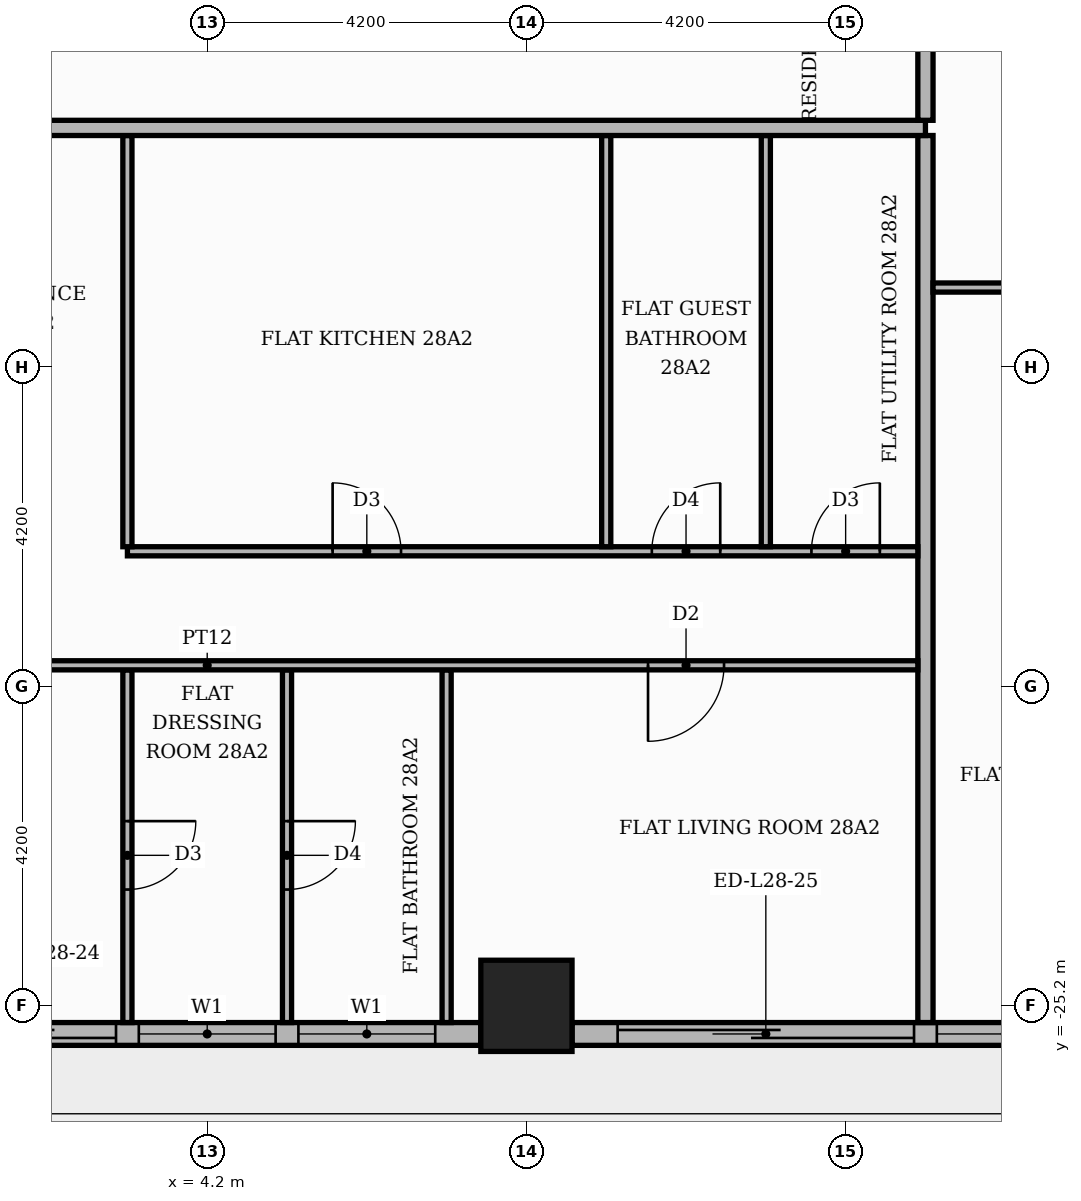
"""IFC4 building model, lengths in metres.
Left out: names, types, materials, properties, quantities, classifications, styles, units other than length and angle.
Written with IfcOpenShell. Run it as: python <this file> out.ifc"""

import sys

from ifc_helpers import new_model, si_unit, direction, frame, frame_2d, origin, origin_2d, place, context, subcontext, project, spatial, rectangle, extrude, element, fill, save


model = new_model("IFC4")
c1 = context("Model", 3, precision=1e-05, world=origin(), true_north=direction((0.0, 1.0)))
c2 = subcontext(c1, "Body", "Model", "MODEL_VIEW")
j1 = project(units=[si_unit("LENGTHUNIT", "METRE"), si_unit("PLANEANGLEUNIT", "RADIAN")], contexts=[c1])
p1 = place(None, origin())
s1 = spatial("IfcSite", under=j1, at=p1, CompositionType="ELEMENT")
p2 = place(p1, origin())
s2 = spatial("IfcBuilding", under=s1, at=p2, CompositionType="ELEMENT")
p3 = place(p2, frame((0.0, 0.0, 118.2)))
s3 = spatial("IfcBuildingStorey", under=s2, at=p3, CompositionType="ELEMENT", Elevation=118.2)
p4 = place(p3, frame((8.4, -25.2, 0.0), z_axis=(0.0, 0.0, 1.0), x_axis=(1.0, 0.0, 0.0)))
e1 = element("IfcColumn", 1, at=p4, inside=s3, PredefinedType="COLUMN", context=c2, shape_type="SweptSolid", body=[
    extrude(rectangle(XDim=1.2, YDim=1.2, at=origin_2d()), origin(), (0.0, 0.0, 1.0), 3.9),
])
p5 = place(p3, frame((0.6, -25.57, 0.0), z_axis=(0.0, 0.0, 1.0), x_axis=(1.0, 0.0, 0.0)))
e2 = element("IfcWall", 2, at=p5, inside=s3, PredefinedType="STANDARD", context=c2, shape_type="SweptSolid", body=[
    extrude(rectangle(XDim=7.2, YDim=0.3, at=frame_2d((3.6, 0.0))), origin(), (0.0, 0.0, 1.0), 3.48),
])
p6 = place(p5, frame((0.6, 0.0, 0.0)))
e3 = element("IfcOpeningElement", 3, at=p6, cuts=e2, PredefinedType="OPENING", context=c2, shape_type="SweptSolid", body=[
    extrude(rectangle(XDim=1.8, YDim=2.4, at=frame_2d((0.9, 1.2))), frame((0.0, 0.16, 0.0), z_axis=(0.0, -1.0, 0.0), x_axis=(1.0, 0.0, 0.0)), (0.0, 0.0, 1.0), 0.32),
])
p7 = place(p5, frame((2.7, 0.0, 0.9)))
e4 = element("IfcOpeningElement", 4, at=p7, cuts=e2, PredefinedType="OPENING", context=c2, shape_type="SweptSolid", body=[
    extrude(rectangle(XDim=1.8, YDim=2.1, at=frame_2d((0.9, 1.05))), frame((0.0, 0.16, 0.0), z_axis=(0.0, -1.0, 0.0), x_axis=(1.0, 0.0, 0.0)), (0.0, 0.0, 1.0), 0.32),
])
p8 = place(p5, frame((4.8, 0.0, 0.9)))
e5 = element("IfcOpeningElement", 5, at=p8, cuts=e2, PredefinedType="OPENING", context=c2, shape_type="SweptSolid", body=[
    extrude(rectangle(XDim=1.8, YDim=2.1, at=frame_2d((0.9, 1.05))), frame((0.0, 0.16, 0.0), z_axis=(0.0, -1.0, 0.0), x_axis=(1.0, 0.0, 0.0)), (0.0, 0.0, 1.0), 0.32),
])
p9 = place(p3, frame((9.0, -25.57, 0.0), z_axis=(0.0, 0.0, 1.0), x_axis=(1.0, 0.0, 0.0)))
e6 = element("IfcWall", 6, at=p9, inside=s3, PredefinedType="STANDARD", context=c2, shape_type="SweptSolid", body=[
    extrude(rectangle(XDim=7.2, YDim=0.3, at=frame_2d((3.6, 0.0))), origin(), (0.0, 0.0, 1.0), 3.48),
])
p10 = place(p9, frame((0.6, 0.0, 0.0)))
e7 = element("IfcOpeningElement", 7, at=p10, cuts=e6, PredefinedType="OPENING", context=c2, shape_type="SweptSolid", body=[
    extrude(rectangle(XDim=3.9, YDim=2.4, at=frame_2d((1.95, 1.2))), frame((0.0, 0.16, 0.0), z_axis=(0.0, -1.0, 0.0), x_axis=(1.0, 0.0, 0.0)), (0.0, 0.0, 1.0), 0.32),
])
p11 = place(p9, frame((4.8, 0.0, 0.9)))
e8 = element("IfcOpeningElement", 8, at=p11, cuts=e6, PredefinedType="OPENING", context=c2, shape_type="SweptSolid", body=[
    extrude(rectangle(XDim=1.8, YDim=2.1, at=frame_2d((0.9, 1.05))), frame((0.0, 0.16, 0.0), z_axis=(0.0, -1.0, 0.0), x_axis=(1.0, 0.0, 0.0)), (0.0, 0.0, 1.0), 0.32),
])
p12 = place(p3, frame((3.15, -25.42, 0.0), z_axis=(0.0, 0.0, 1.0), x_axis=(0.0, 1.0, 0.0)))
e9 = element("IfcWall", 9, at=p12, inside=s3, PredefinedType="PARTITIONING", context=c2, shape_type="SweptSolid", body=[
    extrude(rectangle(XDim=4.64, YDim=0.12, at=frame_2d((2.32, 0.0))), origin(), (0.0, 0.0, 1.0), 3.48),
])
p13 = place(p12, frame((1.75, 0.0, 0.0)))
e10 = element("IfcOpeningElement", 10, at=p13, cuts=e9, PredefinedType="OPENING", context=c2, shape_type="SweptSolid", body=[
    extrude(rectangle(XDim=0.9, YDim=2.1, at=frame_2d((0.45, 1.05))), frame((0.0, 0.07, 0.0), z_axis=(0.0, -1.0, 0.0), x_axis=(1.0, 0.0, 0.0)), (0.0, 0.0, 1.0), 0.14),
])
p14 = place(p3, frame((5.25, -25.42, 0.0), z_axis=(0.0, 0.0, 1.0), x_axis=(0.0, 1.0, 0.0)))
e11 = element("IfcWall", 11, at=p14, inside=s3, PredefinedType="PARTITIONING", context=c2, shape_type="SweptSolid", body=[
    extrude(rectangle(XDim=4.64, YDim=0.12, at=frame_2d((2.32, 0.0))), origin(), (0.0, 0.0, 1.0), 3.48),
])
p15 = place(p14, frame((1.75, 0.0, 0.0)))
e12 = element("IfcOpeningElement", 12, at=p15, cuts=e11, PredefinedType="OPENING", context=c2, shape_type="SweptSolid", body=[
    extrude(rectangle(XDim=0.9, YDim=2.1, at=frame_2d((0.45, 1.05))), frame((0.0, 0.07, 0.0), z_axis=(0.0, -1.0, 0.0), x_axis=(1.0, 0.0, 0.0)), (0.0, 0.0, 1.0), 0.14),
])
p16 = place(p3, frame((7.35, -25.42, 0.0), z_axis=(0.0, 0.0, 1.0), x_axis=(0.0, 1.0, 0.0)))
e13 = element("IfcWall", 13, at=p16, inside=s3, PredefinedType="PARTITIONING", context=c2, shape_type="SweptSolid", body=[
    extrude(rectangle(XDim=4.64, YDim=0.12, at=frame_2d((2.32, 0.0))), origin(), (0.0, 0.0, 1.0), 3.48),
])
p17 = place(p3, frame((13.65, -25.42, 0.0), z_axis=(0.0, 0.0, 1.0), x_axis=(0.0, 1.0, 0.0)))
e14 = element("IfcWall", 14, at=p17, inside=s3, PredefinedType="PARTITIONING", context=c2, shape_type="SweptSolid", body=[
    extrude(rectangle(XDim=11.67, YDim=0.2, at=frame_2d((5.835, 0.0))), origin(), (0.0, 0.0, 1.0), 3.48),
])
p18 = place(p3, frame((-5.15, -20.72, 0.0), z_axis=(0.0, 0.0, 1.0), x_axis=(1.0, 0.0, 0.0)))
e15 = element("IfcWall", 15, at=p18, inside=s3, PredefinedType="PARTITIONING", context=c2, shape_type="SweptSolid", body=[
    extrude(rectangle(XDim=18.7, YDim=0.12, at=frame_2d((9.35, 0.0))), origin(), (0.0, 0.0, 1.0), 3.48),
])
p19 = place(p18, frame((3.65, 0.0, 0.0)))
e16 = element("IfcOpeningElement", 16, at=p19, cuts=e15, PredefinedType="OPENING", context=c2, shape_type="SweptSolid", body=[
    extrude(rectangle(XDim=0.9, YDim=2.1, at=frame_2d((0.45, 1.05))), frame((0.0, 0.07, 0.0), z_axis=(0.0, -1.0, 0.0), x_axis=(1.0, 0.0, 0.0)), (0.0, 0.0, 1.0), 0.14),
])
p20 = place(p18, frame((15.15, 0.0, 0.0)))
e17 = element("IfcOpeningElement", 17, at=p20, cuts=e15, PredefinedType="OPENING", context=c2, shape_type="SweptSolid", body=[
    extrude(rectangle(XDim=1.0, YDim=2.1, at=frame_2d((0.5, 1.05))), frame((0.0, 0.07, 0.0), z_axis=(0.0, -1.0, 0.0), x_axis=(1.0, 0.0, 0.0)), (0.0, 0.0, 1.0), 0.14),
])
p21 = place(p3, frame((3.15, -19.22, 0.0), z_axis=(0.0, 0.0, 1.0), x_axis=(1.0, 0.0, 0.0)))
e18 = element("IfcWall", 18, at=p21, inside=s3, PredefinedType="PARTITIONING", context=c2, shape_type="SweptSolid", body=[
    extrude(rectangle(XDim=10.4, YDim=0.12, at=frame_2d((5.2, 0.0))), origin(), (0.0, 0.0, 1.0), 3.48),
])
p22 = place(p21, frame((2.7, 0.0, 0.0)))
e19 = element("IfcOpeningElement", 19, at=p22, cuts=e18, PredefinedType="OPENING", context=c2, shape_type="SweptSolid", body=[
    extrude(rectangle(XDim=0.9, YDim=2.1, at=frame_2d((0.45, 1.05))), frame((0.0, 0.07, 0.0), z_axis=(0.0, -1.0, 0.0), x_axis=(1.0, 0.0, 0.0)), (0.0, 0.0, 1.0), 0.14),
])
p23 = place(p21, frame((6.9, 0.0, 0.0)))
e20 = element("IfcOpeningElement", 20, at=p23, cuts=e18, PredefinedType="OPENING", context=c2, shape_type="SweptSolid", body=[
    extrude(rectangle(XDim=0.9, YDim=2.1, at=frame_2d((0.45, 1.05))), frame((0.0, 0.07, 0.0), z_axis=(0.0, -1.0, 0.0), x_axis=(1.0, 0.0, 0.0)), (0.0, 0.0, 1.0), 0.14),
])
p24 = place(p21, frame((9.0, 0.0, 0.0)))
e21 = element("IfcOpeningElement", 21, at=p24, cuts=e18, PredefinedType="OPENING", context=c2, shape_type="SweptSolid", body=[
    extrude(rectangle(XDim=0.9, YDim=2.1, at=frame_2d((0.45, 1.05))), frame((0.0, 0.07, 0.0), z_axis=(0.0, -1.0, 0.0), x_axis=(1.0, 0.0, 0.0)), (0.0, 0.0, 1.0), 0.14),
])
for number, where, z_axis, x_axis in (
    (22, (3.15, -19.16, 0.0), (0.0, 0.0, 1.0), (0.0, 1.0, 0.0)),
    (23, (9.45, -19.16, 0.0), (0.0, 0.0, 1.0), (0.0, 1.0, 0.0)),
    (24, (11.55, -19.16, 0.0), (0.0, 0.0, 1.0), (0.0, 1.0, 0.0)),
):
    element("IfcWall", number, at=place(p3, frame(where, z_axis=z_axis, x_axis=x_axis)), inside=s3, PredefinedType="PARTITIONING", context=c2, shape_type="SweptSolid", body=[
        extrude(rectangle(XDim=5.41, YDim=0.12, at=frame_2d((2.705, 0.0))), origin(), (0.0, 0.0, 1.0), 3.48),
    ])
p25 = place(p3, frame((13.75, -15.75, 0.0), z_axis=(0.0, 0.0, 1.0), x_axis=(1.0, 0.0, 0.0)))
e25 = element("IfcWall", 25, at=p25, inside=s3, PredefinedType="PARTITIONING", context=c2, shape_type="SweptSolid", body=[
    extrude(rectangle(XDim=6.07, YDim=0.12, at=frame_2d((3.035, 0.0))), origin(), (0.0, 0.0, 1.0), 3.48),
])
p26 = place(p25, frame((2.485, 0.0, 0.0)))
e26 = element("IfcOpeningElement", 26, at=p26, cuts=e25, PredefinedType="OPENING", context=c2, shape_type="SweptSolid", body=[
    extrude(rectangle(XDim=1.0, YDim=2.1, at=frame_2d((0.5, 1.05))), frame((0.0, 0.07, 0.0), z_axis=(0.0, -1.0, 0.0), x_axis=(1.0, 0.0, 0.0)), (0.0, 0.0, 1.0), 0.14),
])
p27 = place(p3, frame((-20.42, -13.65, 0.0), z_axis=(0.0, 0.0, 1.0), x_axis=(1.0, 0.0, 0.0)))
e27 = element("IfcWall", 27, at=p27, inside=s3, PredefinedType="PARTITIONING", context=c2, shape_type="SweptSolid", body=[
    extrude(rectangle(XDim=34.07, YDim=0.2, at=frame_2d((17.035, 0.0))), origin(), (0.0, 0.0, 1.0), 3.48),
])
p28 = place(p27, frame((8.32, 0.0, 0.0)))
e28 = element("IfcOpeningElement", 28, at=p28, cuts=e27, PredefinedType="OPENING", context=c2, shape_type="SweptSolid", body=[
    extrude(rectangle(XDim=1.1, YDim=2.4, at=frame_2d((0.55, 1.2))), frame((0.0, 0.11, 0.0), z_axis=(0.0, -1.0, 0.0), x_axis=(1.0, 0.0, 0.0)), (0.0, 0.0, 1.0), 0.22),
])
p29 = place(p27, frame((20.92, 0.0, 0.0)))
e29 = element("IfcOpeningElement", 29, at=p29, cuts=e27, PredefinedType="OPENING", context=c2, shape_type="SweptSolid", body=[
    extrude(rectangle(XDim=1.1, YDim=2.4, at=frame_2d((0.55, 1.2))), frame((0.0, 0.11, 0.0), z_axis=(0.0, -1.0, 0.0), x_axis=(1.0, 0.0, 0.0)), (0.0, 0.0, 1.0), 0.22),
])
p30 = place(p3, frame((13.65, -13.55, 0.0), z_axis=(0.0, 0.0, 1.0), x_axis=(0.0, 1.0, 0.0)))
e30 = element("IfcWall", 30, at=p30, inside=s3, PredefinedType="PARTITIONING", context=c2, shape_type="SweptSolid", body=[
    extrude(rectangle(XDim=8.2, YDim=0.2, at=frame_2d((4.1, 0.0))), origin(), (0.0, 0.0, 1.0), 3.48),
])
p31 = place(p30, frame((1.45, 0.0, 0.0)))
e31 = element("IfcOpeningElement", 31, at=p31, cuts=e30, PredefinedType="OPENING", context=c2, shape_type="SweptSolid", body=[
    extrude(rectangle(XDim=1.1, YDim=2.4, at=frame_2d((0.55, 1.2))), frame((0.0, 0.11, 0.0), z_axis=(0.0, -1.0, 0.0), x_axis=(1.0, 0.0, 0.0)), (0.0, 0.0, 1.0), 0.22),
])
p32 = place(p6, origin())
e32 = element("IfcDoor", 32, at=p32, inside=s3, OperationType="SLIDING_TO_LEFT", PredefinedType="DOOR", context=c2, shape_type="SweptSolid", body=[
    extrude(rectangle(XDim=1.8, YDim=2.4, at=frame_2d((0.9, 1.2))), frame((0.0, 0.025, 0.0), z_axis=(0.0, -1.0, 0.0), x_axis=(1.0, 0.0, 0.0)), (0.0, 0.0, 1.0), 0.05),
])
fill(e3, e32)
p33 = place(p7, origin())
e33 = element("IfcWindow", 33, at=p33, inside=s3, PartitioningType="SINGLE_PANEL", PredefinedType="WINDOW", context=c2, shape_type="SweptSolid", body=[
    extrude(rectangle(XDim=1.8, YDim=2.1, at=frame_2d((0.9, 1.05))), frame((0.0, 0.03, 0.0), z_axis=(0.0, -1.0, 0.0), x_axis=(1.0, 0.0, 0.0)), (0.0, 0.0, 1.0), 0.06),
])
fill(e4, e33)
p34 = place(p8, origin())
e34 = element("IfcWindow", 34, at=p34, inside=s3, PartitioningType="SINGLE_PANEL", PredefinedType="WINDOW", context=c2, shape_type="SweptSolid", body=[
    extrude(rectangle(XDim=1.8, YDim=2.1, at=frame_2d((0.9, 1.05))), frame((0.0, 0.03, 0.0), z_axis=(0.0, -1.0, 0.0), x_axis=(1.0, 0.0, 0.0)), (0.0, 0.0, 1.0), 0.06),
])
fill(e5, e34)
p35 = place(p10, origin())
e35 = element("IfcDoor", 35, at=p35, inside=s3, OperationType="SLIDING_TO_LEFT", PredefinedType="DOOR", context=c2, shape_type="SweptSolid", body=[
    extrude(rectangle(XDim=3.9, YDim=2.4, at=frame_2d((1.95, 1.2))), frame((0.0, 0.025, 0.0), z_axis=(0.0, -1.0, 0.0), x_axis=(1.0, 0.0, 0.0)), (0.0, 0.0, 1.0), 0.05),
])
fill(e7, e35)
p36 = place(p11, origin())
e36 = element("IfcWindow", 36, at=p36, inside=s3, PartitioningType="SINGLE_PANEL", PredefinedType="WINDOW", context=c2, shape_type="SweptSolid", body=[
    extrude(rectangle(XDim=1.8, YDim=2.1, at=frame_2d((0.9, 1.05))), frame((0.0, 0.03, 0.0), z_axis=(0.0, -1.0, 0.0), x_axis=(1.0, 0.0, 0.0)), (0.0, 0.0, 1.0), 0.06),
])
fill(e8, e36)
p37 = place(p22, origin())
e37 = element("IfcDoor", 37, at=p37, inside=s3, OperationType="SINGLE_SWING_LEFT", PredefinedType="DOOR", context=c2, shape_type="SweptSolid", body=[
    extrude(rectangle(XDim=0.9, YDim=2.1, at=frame_2d((0.45, 1.05))), frame((0.0, 0.025, 0.0), z_axis=(0.0, -1.0, 0.0), x_axis=(1.0, 0.0, 0.0)), (0.0, 0.0, 1.0), 0.05),
])
fill(e19, e37)
p38 = place(p23, origin())
e38 = element("IfcDoor", 38, at=p38, inside=s3, OperationType="SINGLE_SWING_RIGHT", PredefinedType="DOOR", context=c2, shape_type="SweptSolid", body=[
    extrude(rectangle(XDim=0.9, YDim=2.1, at=frame_2d((0.45, 1.05))), frame((0.0, 0.025, 0.0), z_axis=(0.0, -1.0, 0.0), x_axis=(1.0, 0.0, 0.0)), (0.0, 0.0, 1.0), 0.05),
])
fill(e20, e38)
p39 = place(p24, origin())
e39 = element("IfcDoor", 39, at=p39, inside=s3, OperationType="SINGLE_SWING_RIGHT", PredefinedType="DOOR", context=c2, shape_type="SweptSolid", body=[
    extrude(rectangle(XDim=0.9, YDim=2.1, at=frame_2d((0.45, 1.05))), frame((0.0, 0.025, 0.0), z_axis=(0.0, -1.0, 0.0), x_axis=(1.0, 0.0, 0.0)), (0.0, 0.0, 1.0), 0.05),
])
fill(e21, e39)
p40 = place(p13, frame((0.9, 0.0, 0.0), z_axis=(0.0, 0.0, 1.0), x_axis=(-1.0, 0.0, 0.0)))
e40 = element("IfcDoor", 40, at=p40, inside=s3, OperationType="SINGLE_SWING_RIGHT", PredefinedType="DOOR", context=c2, shape_type="SweptSolid", body=[
    extrude(rectangle(XDim=0.9, YDim=2.1, at=frame_2d((0.45, 1.05))), frame((0.0, 0.025, 0.0), z_axis=(0.0, -1.0, 0.0), x_axis=(1.0, 0.0, 0.0)), (0.0, 0.0, 1.0), 0.05),
])
fill(e10, e40)
p41 = place(p15, frame((0.9, 0.0, 0.0), z_axis=(0.0, 0.0, 1.0), x_axis=(-1.0, 0.0, 0.0)))
e41 = element("IfcDoor", 41, at=p41, inside=s3, OperationType="SINGLE_SWING_RIGHT", PredefinedType="DOOR", context=c2, shape_type="SweptSolid", body=[
    extrude(rectangle(XDim=0.9, YDim=2.1, at=frame_2d((0.45, 1.05))), frame((0.0, 0.025, 0.0), z_axis=(0.0, -1.0, 0.0), x_axis=(1.0, 0.0, 0.0)), (0.0, 0.0, 1.0), 0.05),
])
fill(e12, e41)
p42 = place(p20, frame((1.0, 0.0, 0.0), z_axis=(0.0, 0.0, 1.0), x_axis=(-1.0, 0.0, 0.0)))
e42 = element("IfcDoor", 42, at=p42, inside=s3, OperationType="SINGLE_SWING_LEFT", PredefinedType="DOOR", context=c2, shape_type="SweptSolid", body=[
    extrude(rectangle(XDim=1.0, YDim=2.1, at=frame_2d((0.5, 1.05))), frame((0.0, 0.025, 0.0), z_axis=(0.0, -1.0, 0.0), x_axis=(1.0, 0.0, 0.0)), (0.0, 0.0, 1.0), 0.05),
])
fill(e17, e42)
save(model, sys.argv[1])
